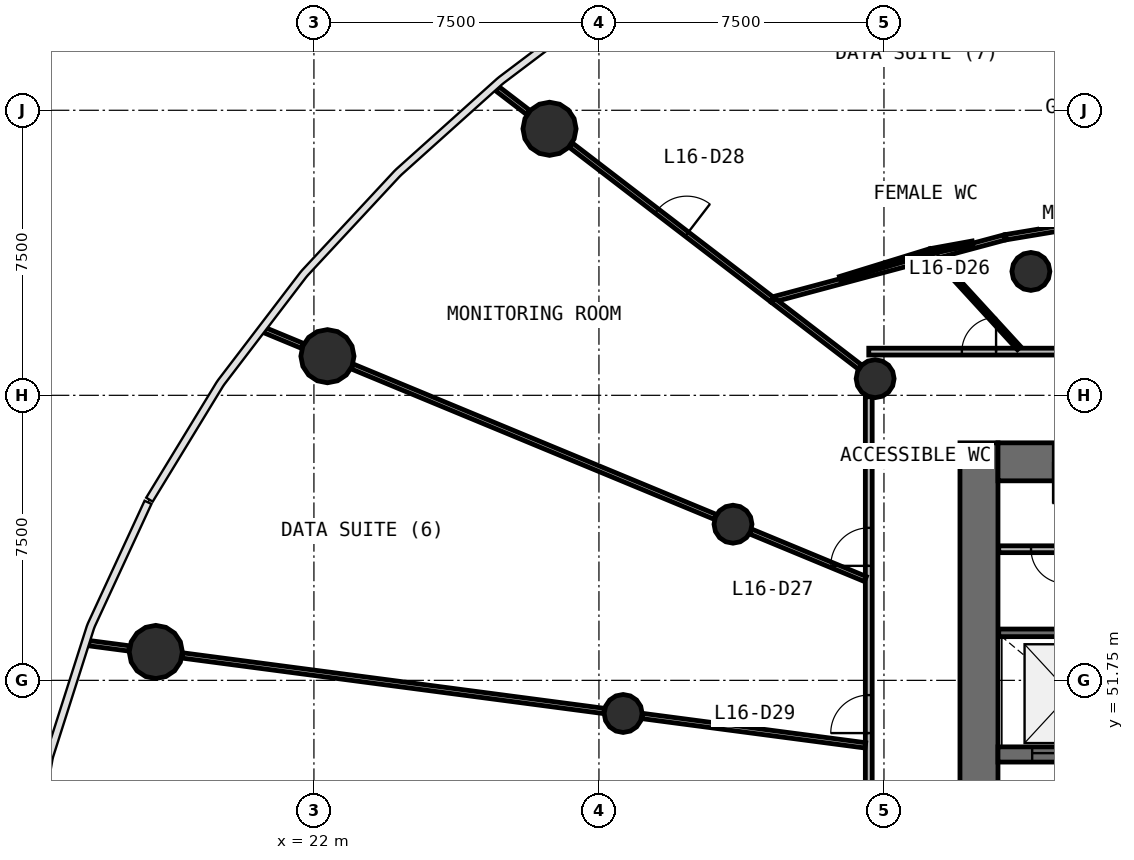
"""IFC4 building model, lengths in metres.
Left out: names, types, materials, properties, quantities, classifications, styles, units other than length and angle.
Written with IfcOpenShell. Run it as: python <this file> out.ifc"""

import sys

from ifc_helpers import new_model, si_unit, direction, frame, frame_2d, origin, origin_2d, place, context, subcontext, project, spatial, rectangle, circle, extrude, source, transform, mapped, element, fill, save


model = new_model("IFC4")
c1 = context("Model", 3, precision=1e-05, world=origin(), true_north=direction((0.0, 1.0)))
c2 = subcontext(c1, "Body", "Model", "MODEL_VIEW")
j1 = project(units=[si_unit("LENGTHUNIT", "METRE"), si_unit("PLANEANGLEUNIT", "RADIAN")], contexts=[c1])
p1 = place(None, origin())
s1 = spatial("IfcSite", under=j1, at=p1, CompositionType="ELEMENT")
p2 = place(p1, origin())
s2 = spatial("IfcBuilding", under=s1, at=p2, CompositionType="ELEMENT")
p3 = place(p2, frame((0.0, 0.0, 71.0)))
s3 = spatial("IfcBuildingStorey", under=s2, at=p3, CompositionType="ELEMENT", Elevation=71.0)
p4 = place(p3, frame((39.5, 58.0, 0.0), z_axis=(0.0, 0.0, 1.0), x_axis=(0.0, -1.0, 0.0)))
e1 = element("IfcWall", 1, at=p4, inside=s3, PredefinedType="SHEAR", context=c2, shape_type="SweptSolid", body=[
    extrude(rectangle(XDim=20.0, YDim=1.0, at=frame_2d((10.0, 0.0))), origin(), (0.0, 0.0, 1.0), 4.4),
])
p5 = place(p4, frame((9.1, 0.0, 0.0)))
e2 = element("IfcOpeningElement", 2, at=p5, cuts=e1, PredefinedType="OPENING", context=c2, shape_type="SweptSolid", body=[
    extrude(rectangle(XDim=1.8, YDim=2.1, at=frame_2d((0.9, 1.05))), frame((0.0, 0.51, 0.0), z_axis=(0.0, -1.0, 0.0), x_axis=(1.0, 0.0, 0.0)), (0.0, 0.0, 1.0), 1.02),
])
p6 = place(p3, frame((64.0, 57.5, 0.0), z_axis=(0.0, 0.0, 1.0), x_axis=(-1.0, 0.0, 0.0)))
e3 = element("IfcWall", 3, at=p6, inside=s3, PredefinedType="SHEAR", context=c2, shape_type="SweptSolid", body=[
    extrude(rectangle(XDim=24.0, YDim=1.0, at=frame_2d((12.0, 0.0))), origin(), (0.0, 0.0, 1.0), 4.4),
])
p7 = place(p6, frame((21.45, 0.0, 0.0)))
e4 = element("IfcOpeningElement", 4, at=p7, cuts=e3, PredefinedType="OPENING", context=c2, shape_type="SweptSolid", body=[
    extrude(rectangle(XDim=1.1, YDim=2.1, at=frame_2d((0.55, 1.05))), frame((0.0, 0.51, 0.0), z_axis=(0.0, -1.0, 0.0), x_axis=(1.0, 0.0, 0.0)), (0.0, 0.0, 1.0), 1.02),
])
p8 = place(p6, frame((1.95, 0.0, 0.0)))
e5 = element("IfcOpeningElement", 5, at=p8, cuts=e3, PredefinedType="OPENING", context=c2, shape_type="SweptSolid", body=[
    extrude(rectangle(XDim=1.1, YDim=2.1, at=frame_2d((0.55, 1.05))), frame((0.0, 0.51, 0.0), z_axis=(0.0, -1.0, 0.0), x_axis=(1.0, 0.0, 0.0)), (0.0, 0.0, 1.0), 1.02),
])
p9 = place(p3, frame((40.0, 49.8, 0.0), z_axis=(0.0, 0.0, 1.0), x_axis=(1.0, 0.0, 0.0)))
e6 = element("IfcWall", 6, at=p9, inside=s3, PredefinedType="SHEAR", context=c2, shape_type="SweptSolid", body=[
    extrude(rectangle(XDim=24.0, YDim=0.4, at=frame_2d((12.0, 0.0))), origin(), (0.0, 0.0, 1.0), 4.4),
])
p10 = place(p9, frame((4.5, 0.0, 0.0)))
e7 = element("IfcOpeningElement", 7, at=p10, cuts=e6, PredefinedType="OPENING", context=c2, shape_type="SweptSolid", body=[
    extrude(rectangle(XDim=1.1, YDim=2.1, at=frame_2d((0.55, 1.05))), frame((0.0, 0.21, 0.0), z_axis=(0.0, -1.0, 0.0), x_axis=(1.0, 0.0, 0.0)), (0.0, 0.0, 1.0), 0.42),
])
p11 = place(p9, frame((7.0, 0.0, 0.0)))
e8 = element("IfcOpeningElement", 8, at=p11, cuts=e6, PredefinedType="OPENING", context=c2, shape_type="SweptSolid", body=[
    extrude(rectangle(XDim=1.1, YDim=2.1, at=frame_2d((0.55, 1.05))), frame((0.0, 0.21, 0.0), z_axis=(0.0, -1.0, 0.0), x_axis=(1.0, 0.0, 0.0)), (0.0, 0.0, 1.0), 0.42),
])
p12 = place(p9, frame((9.5, 0.0, 0.0)))
e9 = element("IfcOpeningElement", 9, at=p12, cuts=e6, PredefinedType="OPENING", context=c2, shape_type="SweptSolid", body=[
    extrude(rectangle(XDim=1.1, YDim=2.1, at=frame_2d((0.55, 1.05))), frame((0.0, 0.21, 0.0), z_axis=(0.0, -1.0, 0.0), x_axis=(1.0, 0.0, 0.0)), (0.0, 0.0, 1.0), 0.42),
])
p13 = place(p9, frame((0.9, 0.0, 0.0)))
e10 = element("IfcOpeningElement", 10, at=p13, cuts=e6, PredefinedType="OPENING", context=c2, shape_type="SweptSolid", body=[
    extrude(rectangle(XDim=1.8, YDim=2.4, at=frame_2d((0.9, 1.2))), frame((0.0, 0.21, 0.0), z_axis=(0.0, -1.0, 0.0), x_axis=(1.0, 0.0, 0.0)), (0.0, 0.0, 1.0), 0.42),
])
p14 = place(p9, frame((20.45, 0.0, 0.0)))
e11 = element("IfcOpeningElement", 11, at=p14, cuts=e6, PredefinedType="OPENING", context=c2, shape_type="SweptSolid", body=[
    extrude(rectangle(XDim=0.9, YDim=2.1, at=frame_2d((0.45, 1.05))), frame((0.0, 0.21, 0.0), z_axis=(0.0, -1.0, 0.0), x_axis=(1.0, 0.0, 0.0)), (0.0, 0.0, 1.0), 0.42),
])
p15 = place(p9, frame((11.65, 0.0, 0.0)))
e12 = element("IfcOpeningElement", 12, at=p15, cuts=e6, PredefinedType="OPENING", context=c2, shape_type="SweptSolid", body=[
    extrude(rectangle(XDim=0.9, YDim=2.1, at=frame_2d((0.45, 1.05))), frame((0.0, 0.21, 0.0), z_axis=(0.0, -1.0, 0.0), x_axis=(1.0, 0.0, 0.0)), (0.0, 0.0, 1.0), 0.42),
])
m1 = source(origin(), c2, "Body", "SweptSolid", [
    extrude(circle(Radius=0.7, at=origin_2d()), origin(), (0.0, 0.0, 1.0), 4.4),
])
for number, where, z_axis, x_axis in (
    (13, (28.199, 66.263, 0.0), (0.0, 0.0, 1.0), (1.0, 0.0, 0.0)),
    (14, (22.355, 60.279, 0.0), (0.0, 0.0, 1.0), (1.0, 0.0, 0.0)),
    (15, (17.839, 52.497, 0.0), (0.0, 0.0, 1.0), (1.0, 0.0, 0.0)),
):
    element("IfcColumn", number, at=place(p3, frame(where, z_axis=z_axis, x_axis=x_axis)), inside=s3, PredefinedType="COLUMN", context=c2, shape_type="MappedRepresentation", body=[
        mapped(m1, transform((0.0, 0.0, 0.0), scale=1.0)),
    ])
m2 = source(origin(), c2, "Body", "SweptSolid", [
    extrude(circle(Radius=0.5, at=origin_2d()), origin(), (0.0, 0.0, 1.0), 4.4),
])
for number, where, z_axis, x_axis in (
    (16, (40.866, 62.51, 0.0), (0.0, 0.0, 1.0), (1.0, 0.0, 0.0)),
    (17, (36.768, 59.688, 0.0), (0.0, 0.0, 1.0), (1.0, 0.0, 0.0)),
    (18, (33.028, 55.859, 0.0), (0.0, 0.0, 1.0), (1.0, 0.0, 0.0)),
    (19, (30.137, 50.878, 0.0), (0.0, 0.0, 1.0), (1.0, 0.0, 0.0)),
):
    element("IfcColumn", number, at=place(p3, frame(where, z_axis=z_axis, x_axis=x_axis)), inside=s3, PredefinedType="COLUMN", context=c2, shape_type="MappedRepresentation", body=[
        mapped(m2, transform((0.0, 0.0, 0.0), scale=1.0)),
    ])
p16 = place(p3, frame((43.8, 53.0, 0.0), z_axis=(0.0, 0.0, 1.0), x_axis=(-1.0, 0.0, 0.0)))
e20 = element("IfcWall", 20, at=p16, inside=s3, PredefinedType="SOLIDWALL", context=c2, shape_type="SweptSolid", body=[
    extrude(rectangle(XDim=3.78, YDim=0.2, at=frame_2d((1.89, 0.0))), origin(), (0.0, 0.0, 1.0), 3.9),
])
p17 = place(p3, frame((36.6, 60.4, 0.0), z_axis=(0.0, 0.0, 1.0), x_axis=(1.0, 0.0, 0.0)))
e21 = element("IfcWall", 21, at=p17, inside=s3, PredefinedType="PARTITIONING", context=c2, shape_type="SweptSolid", body=[
    extrude(rectangle(XDim=30.8, YDim=0.18, at=frame_2d((15.4, 0.0))), origin(), (0.0, 0.0, 1.0), 3.0),
])
p18 = place(p17, frame((9.05, 0.0, 0.0)))
e22 = element("IfcOpeningElement", 22, at=p18, cuts=e21, PredefinedType="OPENING", context=c2, shape_type="SweptSolid", body=[
    extrude(rectangle(XDim=0.9, YDim=2.1, at=frame_2d((0.45, 1.05))), frame((0.0, 0.1, 0.0), z_axis=(0.0, -1.0, 0.0), x_axis=(1.0, 0.0, 0.0)), (0.0, 0.0, 1.0), 0.2),
])
p19 = place(p17, frame((6.05, 0.0, 0.0)))
e23 = element("IfcOpeningElement", 23, at=p19, cuts=e21, PredefinedType="OPENING", context=c2, shape_type="SweptSolid", body=[
    extrude(rectangle(XDim=0.9, YDim=2.1, at=frame_2d((0.45, 1.05))), frame((0.0, 0.1, 0.0), z_axis=(0.0, -1.0, 0.0), x_axis=(1.0, 0.0, 0.0)), (0.0, 0.0, 1.0), 0.2),
])
p20 = place(p17, frame((2.45, 0.0, 0.0)))
e24 = element("IfcOpeningElement", 24, at=p20, cuts=e21, PredefinedType="OPENING", context=c2, shape_type="SweptSolid", body=[
    extrude(rectangle(XDim=0.9, YDim=2.1, at=frame_2d((0.45, 1.05))), frame((0.0, 0.1, 0.0), z_axis=(0.0, -1.0, 0.0), x_axis=(1.0, 0.0, 0.0)), (0.0, 0.0, 1.0), 0.2),
])
p21 = place(p17, frame((20.95, 0.0, 0.0)))
e25 = element("IfcOpeningElement", 25, at=p21, cuts=e21, PredefinedType="OPENING", context=c2, shape_type="SweptSolid", body=[
    extrude(rectangle(XDim=1.0, YDim=2.1, at=frame_2d((0.5, 1.05))), frame((0.0, 0.1, 0.0), z_axis=(0.0, -1.0, 0.0), x_axis=(1.0, 0.0, 0.0)), (0.0, 0.0, 1.0), 0.2),
])
p22 = place(p17, frame((14.95, 0.0, 0.0)))
e26 = element("IfcOpeningElement", 26, at=p22, cuts=e21, PredefinedType="OPENING", context=c2, shape_type="SweptSolid", body=[
    extrude(rectangle(XDim=1.0, YDim=2.1, at=frame_2d((0.5, 1.05))), frame((0.0, 0.1, 0.0), z_axis=(0.0, -1.0, 0.0), x_axis=(1.0, 0.0, 0.0)), (0.0, 0.0, 1.0), 0.2),
])
p23 = place(p17, frame((12.55, 0.0, 0.0)))
e27 = element("IfcOpeningElement", 27, at=p23, cuts=e21, PredefinedType="OPENING", context=c2, shape_type="SweptSolid", body=[
    extrude(rectangle(XDim=1.0, YDim=2.1, at=frame_2d((0.5, 1.05))), frame((0.0, 0.1, 0.0), z_axis=(0.0, -1.0, 0.0), x_axis=(1.0, 0.0, 0.0)), (0.0, 0.0, 1.0), 0.2),
])
p24 = place(p3, frame((36.6, 35.63, 0.0), z_axis=(0.0, 0.0, 1.0), x_axis=(0.0, 1.0, 0.0)))
e28 = element("IfcWall", 28, at=p24, inside=s3, PredefinedType="PARTITIONING", context=c2, shape_type="SweptSolid", body=[
    extrude(rectangle(XDim=23.583, YDim=0.18, at=frame_2d((11.791, 0.0))), origin(), (0.0, 0.0, 1.0), 3.0),
])
p25 = place(p24, frame((19.133, 0.0, 0.0)))
e29 = element("IfcOpeningElement", 29, at=p25, cuts=e28, PredefinedType="OPENING", context=c2, shape_type="SweptSolid", body=[
    extrude(rectangle(XDim=1.0, YDim=2.1, at=frame_2d((0.5, 1.05))), frame((0.0, 0.1, 0.0), z_axis=(0.0, -1.0, 0.0), x_axis=(1.0, 0.0, 0.0)), (0.0, 0.0, 1.0), 0.2),
])
p26 = place(p24, frame((14.732, 0.0, 0.0)))
e30 = element("IfcOpeningElement", 30, at=p26, cuts=e28, PredefinedType="OPENING", context=c2, shape_type="SweptSolid", body=[
    extrude(rectangle(XDim=1.0, YDim=2.1, at=frame_2d((0.5, 1.05))), frame((0.0, 0.1, 0.0), z_axis=(0.0, -1.0, 0.0), x_axis=(1.0, 0.0, 0.0)), (0.0, 0.0, 1.0), 0.2),
])
p27 = place(p24, frame((11.333, 0.0, 0.0)))
e31 = element("IfcOpeningElement", 31, at=p27, cuts=e28, PredefinedType="OPENING", context=c2, shape_type="SweptSolid", body=[
    extrude(rectangle(XDim=1.0, YDim=2.1, at=frame_2d((0.5, 1.05))), frame((0.0, 0.1, 0.0), z_axis=(0.0, -1.0, 0.0), x_axis=(1.0, 0.0, 0.0)), (0.0, 0.0, 1.0), 0.2),
])
p28 = place(p24, frame((4.532, 0.0, 0.0)))
e32 = element("IfcOpeningElement", 32, at=p28, cuts=e28, PredefinedType="OPENING", context=c2, shape_type="SweptSolid", body=[
    extrude(rectangle(XDim=1.0, YDim=2.1, at=frame_2d((0.5, 1.05))), frame((0.0, 0.1, 0.0), z_axis=(0.0, -1.0, 0.0), x_axis=(1.0, 0.0, 0.0)), (0.0, 0.0, 1.0), 0.2),
])
p29 = place(p3, frame((43.77, 55.2, 0.0), z_axis=(0.0, 0.0, 1.0), x_axis=(-1.0, 0.0, 0.0)))
e33 = element("IfcWall", 33, at=p29, inside=s3, PredefinedType="PARTITIONING", context=c2, shape_type="SweptSolid", body=[
    extrude(rectangle(XDim=3.75, YDim=0.18, at=frame_2d((1.875, 0.0))), origin(), (0.0, 0.0, 1.0), 3.9),
])
p30 = place(p29, frame((2.0, 0.0, 0.0)))
e34 = element("IfcOpeningElement", 34, at=p30, cuts=e33, PredefinedType="OPENING", context=c2, shape_type="SweptSolid", body=[
    extrude(rectangle(XDim=0.9, YDim=2.1, at=frame_2d((0.45, 1.05))), frame((0.0, 0.1, 0.0), z_axis=(0.0, -1.0, 0.0), x_axis=(1.0, 0.0, 0.0)), (0.0, 0.0, 1.0), 0.2),
])
p31 = place(p29, frame((0.6, 0.0, 0.0)))
e35 = element("IfcOpeningElement", 35, at=p31, cuts=e33, PredefinedType="OPENING", context=c2, shape_type="SweptSolid", body=[
    extrude(rectangle(XDim=0.9, YDim=2.1, at=frame_2d((0.45, 1.05))), frame((0.0, 0.1, 0.0), z_axis=(0.0, -1.0, 0.0), x_axis=(1.0, 0.0, 0.0)), (0.0, 0.0, 1.0), 0.2),
])
p32 = place(p3, frame((29.637, 50.944, 0.0), z_axis=(0.0, 0.0, 1.0), x_axis=(-0.991443306772, 0.130538000051, 0.0)))
e36 = element("IfcWall", 36, at=p32, inside=s3, PredefinedType="PARTITIONING", context=c2, shape_type="SweptSolid", body=[
    extrude(rectangle(XDim=11.195, YDim=0.14, at=frame_2d((5.598, 0.0))), origin(), (0.0, 0.0, 1.0), 3.0),
])
p33 = place(p3, frame((32.561, 56.052, 0.0), z_axis=(0.0, 0.0, 1.0), x_axis=(-0.923874685699, 0.382695133396, 0.0)))
e37 = element("IfcWall", 37, at=p33, inside=s3, PredefinedType="PARTITIONING", context=c2, shape_type="SweptSolid", body=[
    extrude(rectangle(XDim=10.341, YDim=0.14, at=frame_2d((5.17, 0.0))), origin(), (0.0, 0.0, 1.0), 3.0),
])
p34 = place(p3, frame((28.758, 65.834, 0.0), z_axis=(0.0, 0.0, 1.0), x_axis=(0.793370473237, -0.608739100268, 0.0)))
e38 = element("IfcWall", 38, at=p34, inside=s3, PredefinedType="PARTITIONING", context=c2, shape_type="SweptSolid", body=[
    extrude(rectangle(XDim=6.682, YDim=0.14, at=frame_2d((3.341, 0.0))), origin(), (0.0, 0.0, 1.0), 3.0),
])
p35 = place(p34, frame((2.85, 0.0, 0.0)))
e39 = element("IfcOpeningElement", 39, at=p35, cuts=e38, PredefinedType="OPENING", context=c2, shape_type="SweptSolid", body=[
    extrude(rectangle(XDim=1.0, YDim=2.1, at=frame_2d((0.5, 1.05))), frame((0.0, 0.08, 0.0), z_axis=(0.0, -1.0, 0.0), x_axis=(1.0, 0.0, 0.0)), (0.0, 0.0, 1.0), 0.16),
])
p36 = place(p3, frame((40.179, 63.406, 0.0), z_axis=(0.0, 0.0, 1.0), x_axis=(-0.965952889726, -0.258718021851, 0.0)))
e40 = element("IfcWall", 40, at=p36, inside=s3, PredefinedType="PARTITIONING", context=c2, shape_type="SweptSolid", body=[
    extrude(rectangle(XDim=6.305, YDim=0.14, at=frame_2d((3.153, 0.0))), origin(), (0.0, 0.0, 1.0), 3.0),
])
p37 = place(p3, frame((36.51, 50.039, 0.0), z_axis=(0.0, 0.0, 1.0), x_axis=(-0.991445034615, 0.130524876315, 0.0)))
e41 = element("IfcWall", 41, at=p37, inside=s3, PredefinedType="PARTITIONING", context=c2, shape_type="SweptSolid", body=[
    extrude(rectangle(XDim=5.924, YDim=0.14, at=frame_2d((2.962, 0.0))), origin(), (0.0, 0.0, 1.0), 3.0),
])
p38 = place(p3, frame((44.79, 64.173, 0.0), z_axis=(0.0, 0.0, 1.0), x_axis=(-0.986452107545, -0.164049503258, 0.0)))
e42 = element("IfcWall", 42, at=p38, inside=s3, PredefinedType="PARTITIONING", context=c2, shape_type="SweptSolid", body=[
    extrude(rectangle(XDim=4.645, YDim=0.14, at=frame_2d((2.322, 0.0))), origin(), (0.0, 0.0, 1.0), 3.0),
])
p39 = place(p3, frame((36.51, 54.416, 0.0), z_axis=(0.0, 0.0, 1.0), x_axis=(-0.923911109142, 0.382607190737, 0.0)))
e43 = element("IfcWall", 43, at=p39, inside=s3, PredefinedType="PARTITIONING", context=c2, shape_type="SweptSolid", body=[
    extrude(rectangle(XDim=3.264, YDim=0.14, at=frame_2d((1.632, 0.0))), origin(), (0.0, 0.0, 1.0), 3.0),
])
p40 = place(p3, frame((36.367, 59.995, 0.0), z_axis=(0.0, 0.0, 1.0), x_axis=(-0.793375175499, 0.608732971755, 0.0)))
e44 = element("IfcWall", 44, at=p40, inside=s3, PredefinedType="PARTITIONING", context=c2, shape_type="SweptSolid", body=[
    extrude(rectangle(XDim=2.873, YDim=0.14, at=frame_2d((1.437, 0.0))), origin(), (0.0, 0.0, 1.0), 3.0),
])
p41 = place(p3, frame((21.704, 60.549, 0.0), z_axis=(0.0, 0.0, 1.0), x_axis=(-0.923891962865, 0.382653421457, 0.0)))
e45 = element("IfcWall", 45, at=p41, inside=s3, PredefinedType="PARTITIONING", context=c2, shape_type="SweptSolid", body=[
    extrude(rectangle(XDim=1.096, YDim=0.14, at=frame_2d((0.548, 0.0))), origin(), (0.0, 0.0, 1.0), 3.0),
])
p42 = place(p3, frame((17.141, 52.589, 0.0), z_axis=(0.0, 0.0, 1.0), x_axis=(-0.991441129852, 0.130554532814, 0.0)))
e46 = element("IfcWall", 46, at=p42, inside=s3, PredefinedType="PARTITIONING", context=c2, shape_type="SweptSolid", body=[
    extrude(rectangle(XDim=1.073, YDim=0.14, at=frame_2d((0.537, 0.0))), origin(), (0.0, 0.0, 1.0), 3.0),
])
p43 = place(p3, frame((27.641, 66.691, 0.0), z_axis=(0.0, 0.0, 1.0), x_axis=(-0.793207707095, 0.608951174895, 0.0)))
e47 = element("IfcWall", 47, at=p43, inside=s3, PredefinedType="PARTITIONING", context=c2, shape_type="SweptSolid", body=[
    extrude(rectangle(XDim=1.026, YDim=0.14, at=frame_2d((0.513, 0.0))), origin(), (0.0, 0.0, 1.0), 3.0),
])
p44 = place(p3, frame((38.212, 63.047, 0.0), z_axis=(0.0, 0.0, 1.0), x_axis=(-0.955599721478, -0.294667901731, 0.0)))
e48 = element("IfcWall", 48, at=p44, inside=s3, PredefinedType="PARTITIONING", context=c2, shape_type="SweptSolid", body=[
    extrude(rectangle(XDim=2.476, YDim=0.12, at=frame_2d((1.238, 0.0))), origin(), (0.0, 0.0, 1.0), 3.0),
])
p45 = place(p3, frame((40.555, 60.49, 0.0), z_axis=(0.0, 0.0, 1.0), x_axis=(-0.675593584158, 0.737274242765, 0.0)))
e49 = element("IfcWall", 49, at=p45, inside=s3, PredefinedType="PARTITIONING", context=c2, shape_type="SweptSolid", body=[
    extrude(rectangle(XDim=3.206, YDim=0.12, at=frame_2d((1.603, 0.0))), origin(), (0.0, 0.0, 1.0), 3.0),
])
p46 = place(p3, frame((39.332, 63.251, 0.0), z_axis=(0.0, 0.0, 1.0), x_axis=(-0.983774673589, -0.179408449088, 0.0)))
e50 = element("IfcWall", 50, at=p46, inside=s3, PredefinedType="PARTITIONING", context=c2, shape_type="SweptSolid", body=[
    extrude(rectangle(XDim=1.109, YDim=0.12, at=frame_2d((0.555, 0.0))), origin(), (0.0, 0.0, 1.0), 3.0),
])
m3 = source(origin(), c2, "Body", "SweptSolid", [
    extrude(rectangle(XDim=1.8, YDim=2.4, at=frame_2d((0.9, 1.2))), frame((0.0, 0.025, 0.0), z_axis=(0.0, -1.0, 0.0), x_axis=(1.0, 0.0, 0.0)), (0.0, 0.0, 1.0), 0.05),
])
p47 = place(p13, origin())
e51 = element("IfcDoor", 51, at=p47, inside=s3, OperationType="DOUBLE_DOOR_SLIDING", PredefinedType="USERDEFINED", context=c2, shape_type="MappedRepresentation", body=[
    mapped(m3, transform((0.0, 0.0, 0.0), scale=1.0)),
])
fill(e10, e51)
m4 = source(origin(), c2, "Body", "SweptSolid", [
    extrude(rectangle(XDim=1.1, YDim=2.1, at=frame_2d((0.55, 1.05))), frame((0.0, 0.025, 0.0), z_axis=(0.0, -1.0, 0.0), x_axis=(1.0, 0.0, 0.0)), (0.0, 0.0, 1.0), 0.05),
])
p48 = place(p7, origin())
e52 = element("IfcDoor", 52, at=p48, inside=s3, OperationType="SINGLE_SWING_RIGHT", PredefinedType="DOOR", context=c2, shape_type="MappedRepresentation", body=[
    mapped(m4, transform((0.0, 0.0, 0.0), scale=1.0)),
])
fill(e4, e52)
m5 = source(origin(), c2, "Body", "SweptSolid", [
    extrude(rectangle(XDim=0.9, YDim=2.1, at=frame_2d((0.45, 1.05))), frame((0.0, 0.025, 0.0), z_axis=(0.0, -1.0, 0.0), x_axis=(1.0, 0.0, 0.0)), (0.0, 0.0, 1.0), 0.05),
])
p49 = place(p20, origin())
e53 = element("IfcDoor", 53, at=p49, inside=s3, OperationType="SINGLE_SWING_RIGHT", PredefinedType="DOOR", context=c2, shape_type="MappedRepresentation", body=[
    mapped(m5, transform((0.0, 0.0, 0.0), scale=1.0)),
])
fill(e24, e53)
m6 = source(origin(), c2, "Body", "SweptSolid", [
    extrude(rectangle(XDim=1.0, YDim=2.1, at=frame_2d((0.5, 1.05))), frame((0.0, 0.025, 0.0), z_axis=(0.0, -1.0, 0.0), x_axis=(1.0, 0.0, 0.0)), (0.0, 0.0, 1.0), 0.05),
])
p50 = place(p25, origin())
e54 = element("IfcDoor", 54, at=p50, inside=s3, OperationType="SINGLE_SWING_LEFT", PredefinedType="DOOR", context=c2, shape_type="MappedRepresentation", body=[
    mapped(m6, transform((0.0, 0.0, 0.0), scale=1.0)),
])
fill(e29, e54)
p51 = place(p35, origin())
e55 = element("IfcDoor", 55, at=p51, inside=s3, OperationType="SINGLE_SWING_RIGHT", PredefinedType="DOOR", context=c2, shape_type="MappedRepresentation", body=[
    mapped(m6, transform((0.0, 0.0, 0.0), scale=1.0)),
])
fill(e39, e55)
p52 = place(p26, origin())
e56 = element("IfcDoor", 56, at=p52, inside=s3, OperationType="SINGLE_SWING_LEFT", PredefinedType="DOOR", context=c2, shape_type="MappedRepresentation", body=[
    mapped(m6, transform((0.0, 0.0, 0.0), scale=1.0)),
])
fill(e30, e56)
m7 = source(origin(), c2, "Body", "SweptSolid", [
    extrude(rectangle(XDim=0.9, YDim=2.1, at=frame_2d((0.45, 1.05))), frame((0.0, 0.025, 0.0), z_axis=(0.0, -1.0, 0.0), x_axis=(1.0, 0.0, 0.0)), (0.0, 0.0, 1.0), 0.05),
])
p53 = place(p30, origin())
e57 = element("IfcDoor", 57, at=p53, inside=s3, OperationType="SINGLE_SWING_LEFT", PredefinedType="DOOR", context=c2, shape_type="MappedRepresentation", body=[
    mapped(m7, transform((0.0, 0.0, 0.0), scale=1.0)),
])
fill(e34, e57)
save(model, sys.argv[1])
